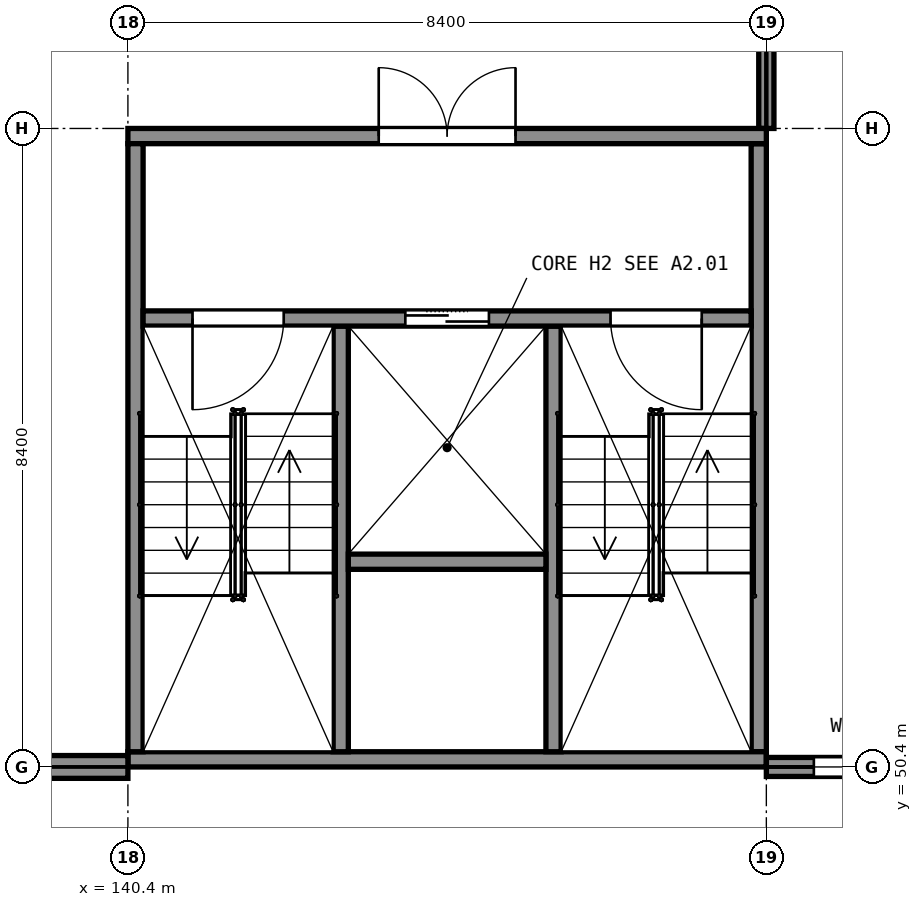
"""IFC4 building model, lengths in metres.
Left out: names, types, materials, properties, quantities, classifications, styles, units other than length and angle.
Written with IfcOpenShell. Run it as: python <this file> out.ifc"""

import sys

from ifc_helpers import new_model, si_unit, direction, frame, frame_2d, origin, place, context, subcontext, project, spatial, polyline, rectangle, outline, extrude, element, fill, save


model = new_model("IFC4")
c1 = context("Model", 3, precision=1e-05, world=origin(), true_north=direction((0.0, 1.0)))
c2 = subcontext(c1, "Body", "Model", "MODEL_VIEW")
j1 = project(units=[si_unit("LENGTHUNIT", "METRE"), si_unit("PLANEANGLEUNIT", "RADIAN")], contexts=[c1])
p1 = place(None, origin())
s1 = spatial("IfcSite", under=j1, at=p1, CompositionType="ELEMENT")
p2 = place(p1, origin())
s2 = spatial("IfcBuilding", under=s1, at=p2, CompositionType="ELEMENT")
p3 = place(p2, frame((0.0, 0.0, 10.5)))
s3 = spatial("IfcBuildingStorey", under=s2, at=p3, CompositionType="ELEMENT", Elevation=10.5)
p4 = place(p3, frame((140.4, 50.5, 0.0), z_axis=(0.0, 0.0, 1.0), x_axis=(1.0, 0.0, 0.0)))
e1 = element("IfcWall", 1, at=p4, inside=s3, PredefinedType="SHEAR", context=c2, shape_type="SweptSolid", body=[
    extrude(rectangle(XDim=8.4, YDim=0.2, at=frame_2d((4.2, 0.0))), origin(), (0.0, 0.0, 1.0), 9.5),
])
p5 = place(p3, frame((140.4, 58.7, 0.0), z_axis=(0.0, 0.0, 1.0), x_axis=(1.0, 0.0, 0.0)))
e2 = element("IfcWall", 2, at=p5, inside=s3, PredefinedType="SHEAR", context=c2, shape_type="SweptSolid", body=[
    extrude(rectangle(XDim=8.4, YDim=0.2, at=frame_2d((4.2, 0.0))), origin(), (0.0, 0.0, 1.0), 9.5),
])
p6 = place(p5, frame((3.3, 0.0, 0.0)))
e3 = element("IfcOpeningElement", 3, at=p6, cuts=e2, PredefinedType="OPENING", context=c2, shape_type="SweptSolid", body=[
    extrude(rectangle(XDim=1.8, YDim=2.1, at=frame_2d((0.9, 1.05))), frame((0.0, 0.11, 0.0), z_axis=(0.0, -1.0, 0.0), x_axis=(1.0, 0.0, 0.0)), (0.0, 0.0, 1.0), 0.22),
])
for number, where, z_axis, x_axis in (
    (4, (140.5, 50.6, 0.0), (0.0, 0.0, 1.0), (0.0, 1.0, 0.0)),
    (5, (148.7, 50.6, 0.0), (0.0, 0.0, 1.0), (0.0, 1.0, 0.0)),
):
    element("IfcWall", number, at=place(p3, frame(where, z_axis=z_axis, x_axis=x_axis)), inside=s3, PredefinedType="SHEAR", context=c2, shape_type="SweptSolid", body=[
        extrude(rectangle(XDim=8.0, YDim=0.2, at=frame_2d((4.0, 0.0))), origin(), (0.0, 0.0, 1.0), 9.5),
    ])
p7 = place(p3, frame((140.6, 56.3, 0.0), z_axis=(0.0, 0.0, 1.0), x_axis=(1.0, 0.0, 0.0)))
e6 = element("IfcWall", 6, at=p7, inside=s3, PredefinedType="SHEAR", context=c2, shape_type="SweptSolid", body=[
    extrude(rectangle(XDim=8.0, YDim=0.2, at=frame_2d((4.0, 0.0))), origin(), (0.0, 0.0, 1.0), 9.5),
])
p8 = place(p7, frame((0.65, 0.0, 0.0)))
e7 = element("IfcOpeningElement", 7, at=p8, cuts=e6, PredefinedType="OPENING", context=c2, shape_type="SweptSolid", body=[
    extrude(rectangle(XDim=1.2, YDim=2.1, at=frame_2d((0.6, 1.05))), frame((0.0, 0.11, 0.0), z_axis=(0.0, -1.0, 0.0), x_axis=(1.0, 0.0, 0.0)), (0.0, 0.0, 1.0), 0.22),
])
p9 = place(p7, frame((6.15, 0.0, 0.0)))
e8 = element("IfcOpeningElement", 8, at=p9, cuts=e6, PredefinedType="OPENING", context=c2, shape_type="SweptSolid", body=[
    extrude(rectangle(XDim=1.2, YDim=2.1, at=frame_2d((0.6, 1.05))), frame((0.0, 0.11, 0.0), z_axis=(0.0, -1.0, 0.0), x_axis=(1.0, 0.0, 0.0)), (0.0, 0.0, 1.0), 0.22),
])
p10 = place(p7, frame((3.45, 0.0, 0.0)))
e9 = element("IfcOpeningElement", 9, at=p10, cuts=e6, PredefinedType="OPENING", context=c2, shape_type="SweptSolid", body=[
    extrude(rectangle(XDim=1.1, YDim=2.1, at=frame_2d((0.55, 1.05))), frame((0.0, 0.11, 0.0), z_axis=(0.0, -1.0, 0.0), x_axis=(1.0, 0.0, 0.0)), (0.0, 0.0, 1.0), 0.22),
])
for number, where, z_axis, x_axis in (
    (10, (143.2, 50.6, 0.0), (0.0, 0.0, 1.0), (0.0, 1.0, 0.0)),
    (11, (146.0, 50.6, 0.0), (0.0, 0.0, 1.0), (0.0, 1.0, 0.0)),
):
    element("IfcWall", number, at=place(p3, frame(where, z_axis=z_axis, x_axis=x_axis)), inside=s3, PredefinedType="SHEAR", context=c2, shape_type="SweptSolid", body=[
        extrude(rectangle(XDim=5.6, YDim=0.2, at=frame_2d((2.8, 0.0))), origin(), (0.0, 0.0, 1.0), 9.5),
    ])
p11 = place(p3, frame((143.3, 53.1, 0.0), z_axis=(0.0, 0.0, 1.0), x_axis=(1.0, 0.0, 0.0)))
e12 = element("IfcWall", 12, at=p11, inside=s3, PredefinedType="SHEAR", context=c2, shape_type="SweptSolid", body=[
    extrude(rectangle(XDim=2.6, YDim=0.2, at=frame_2d((1.3, 0.0))), origin(), (0.0, 0.0, 1.0), 9.5),
])
p12 = place(p3, frame((132.35, 50.4, 0.0), z_axis=(0.0, 0.0, 1.0), x_axis=(1.0, 0.0, 0.0)))
e13 = element("IfcWall", 13, at=p12, inside=s3, PredefinedType="SOLIDWALL", context=c2, shape_type="SweptSolid", body=[
    extrude(rectangle(XDim=8.05, YDim=0.3, at=frame_2d((4.025, 0.0))), origin(), (0.0, 0.0, 1.0), 8.44),
])
p13 = place(p12, frame((2.325, 0.0, 1.5)))
e14 = element("IfcOpeningElement", 14, at=p13, cuts=e13, PredefinedType="OPENING", context=c2, shape_type="SweptSolid", body=[
    extrude(rectangle(XDim=0.6, YDim=6.0, at=frame_2d((0.3, 3.0))), frame((0.0, 0.16, 0.0), z_axis=(0.0, -1.0, 0.0), x_axis=(1.0, 0.0, 0.0)), (0.0, 0.0, 1.0), 0.32),
])
p14 = place(p12, frame((5.125, 0.0, 1.5)))
e15 = element("IfcOpeningElement", 15, at=p14, cuts=e13, PredefinedType="OPENING", context=c2, shape_type="SweptSolid", body=[
    extrude(rectangle(XDim=0.6, YDim=6.0, at=frame_2d((0.3, 3.0))), frame((0.0, 0.16, 0.0), z_axis=(0.0, -1.0, 0.0), x_axis=(1.0, 0.0, 0.0)), (0.0, 0.0, 1.0), 0.32),
])
p15 = place(p3, frame((148.8, 50.4, 0.0), z_axis=(0.0, 0.0, 1.0), x_axis=(1.0, 0.0, 0.0)))
e16 = element("IfcWall", 16, at=p15, inside=s3, PredefinedType="SOLIDWALL", context=c2, shape_type="SweptSolid", body=[
    extrude(outline(polyline([(0.0, 0.0), (8.05, 0.0), (8.05, 9.442), (0.0, 11.742), (0.0, 0.0)])), frame((0.0, 0.125, 0.0), z_axis=(0.0, -1.0, 0.0), x_axis=(1.0, 0.0, 0.0)), (0.0, 0.0, 1.0), 0.25),
])
p16 = place(p15, frame((0.625, 0.0, 0.9)))
e17 = element("IfcOpeningElement", 17, at=p16, cuts=e16, PredefinedType="OPENING", context=c2, shape_type="SweptSolid", body=[
    extrude(rectangle(XDim=1.2, YDim=6.0, at=frame_2d((0.6, 3.0))), frame((0.0, 0.135, 0.0), z_axis=(0.0, -1.0, 0.0), x_axis=(1.0, 0.0, 0.0)), (0.0, 0.0, 1.0), 0.27),
])
p17 = place(p15, frame((3.425, 0.0, 0.9)))
e18 = element("IfcOpeningElement", 18, at=p17, cuts=e16, PredefinedType="OPENING", context=c2, shape_type="SweptSolid", body=[
    extrude(rectangle(XDim=1.2, YDim=6.0, at=frame_2d((0.6, 3.0))), frame((0.0, 0.135, 0.0), z_axis=(0.0, -1.0, 0.0), x_axis=(1.0, 0.0, 0.0)), (0.0, 0.0, 1.0), 0.27),
])
p18 = place(p15, frame((6.225, 0.0, 0.9)))
e19 = element("IfcOpeningElement", 19, at=p18, cuts=e16, PredefinedType="OPENING", context=c2, shape_type="SweptSolid", body=[
    extrude(rectangle(XDim=1.2, YDim=6.0, at=frame_2d((0.6, 3.0))), frame((0.0, 0.135, 0.0), z_axis=(0.0, -1.0, 0.0), x_axis=(1.0, 0.0, 0.0)), (0.0, 0.0, 1.0), 0.27),
])
p19 = place(p3, frame((148.8, 58.8, 0.0), z_axis=(0.0, 0.0, 1.0), x_axis=(0.0, 1.0, 0.0)))
e20 = element("IfcWall", 20, at=p19, inside=s3, PredefinedType="PARTITIONING", context=c2, shape_type="SweptSolid", body=[
    extrude(rectangle(XDim=8.05, YDim=0.2, at=frame_2d((4.025, 0.0))), origin(), (0.0, 0.0, 1.0), 8.4),
])
p20 = place(p19, frame((1.025, 0.0, 0.0)))
e21 = element("IfcOpeningElement", 21, at=p20, cuts=e20, PredefinedType="OPENING", context=c2, shape_type="SweptSolid", body=[
    extrude(rectangle(XDim=2.4, YDim=2.4, at=frame_2d((1.2, 1.2))), frame((0.0, 0.11, 0.0), z_axis=(0.0, -1.0, 0.0), x_axis=(1.0, 0.0, 0.0)), (0.0, 0.0, 1.0), 0.22),
])
p21 = place(p16, origin())
e22 = element("IfcWindow", 22, at=p21, inside=s3, PartitioningType="SINGLE_PANEL", PredefinedType="WINDOW", context=c2, shape_type="SweptSolid", body=[
    extrude(rectangle(XDim=1.2, YDim=6.0, at=frame_2d((0.6, 3.0))), frame((0.0, 0.105, 0.0), z_axis=(0.0, -1.0, 0.0), x_axis=(1.0, 0.0, 0.0)), (0.0, 0.0, 1.0), 0.06),
])
fill(e17, e22)
p22 = place(p6, origin())
e23 = element("IfcDoor", 23, at=p22, inside=s3, OperationType="DOUBLE_DOOR_SINGLE_SWING", PredefinedType="DOOR", context=c2, shape_type="SweptSolid", body=[
    extrude(rectangle(XDim=1.8, YDim=2.1, at=frame_2d((0.9, 1.05))), frame((0.0, 0.025, 0.0), z_axis=(0.0, -1.0, 0.0), x_axis=(1.0, 0.0, 0.0)), (0.0, 0.0, 1.0), 0.05),
])
fill(e3, e23)
p23 = place(p8, origin())
e24 = element("IfcDoor", 24, at=p23, inside=s3, OperationType="SINGLE_SWING_LEFT", PredefinedType="DOOR", context=c2, shape_type="SweptSolid", body=[
    extrude(rectangle(XDim=1.2, YDim=2.1, at=frame_2d((0.6, 1.05))), frame((0.0, 0.025, 0.0), z_axis=(0.0, -1.0, 0.0), x_axis=(1.0, 0.0, 0.0)), (0.0, 0.0, 1.0), 0.05),
])
fill(e7, e24)
p24 = place(p9, origin())
e25 = element("IfcDoor", 25, at=p24, inside=s3, OperationType="SINGLE_SWING_RIGHT", PredefinedType="DOOR", context=c2, shape_type="SweptSolid", body=[
    extrude(rectangle(XDim=1.2, YDim=2.1, at=frame_2d((0.6, 1.05))), frame((0.0, 0.025, 0.0), z_axis=(0.0, -1.0, 0.0), x_axis=(1.0, 0.0, 0.0)), (0.0, 0.0, 1.0), 0.05),
])
fill(e8, e25)
p25 = place(p10, origin())
e26 = element("IfcDoor", 26, at=p25, inside=s3, OperationType="DOUBLE_DOOR_SLIDING", PredefinedType="DOOR", context=c2, shape_type="SweptSolid", body=[
    extrude(rectangle(XDim=1.1, YDim=2.1, at=frame_2d((0.55, 1.05))), frame((0.0, 0.025, 0.0), z_axis=(0.0, -1.0, 0.0), x_axis=(1.0, 0.0, 0.0)), (0.0, 0.0, 1.0), 0.05),
])
fill(e9, e26)
save(model, sys.argv[1])
